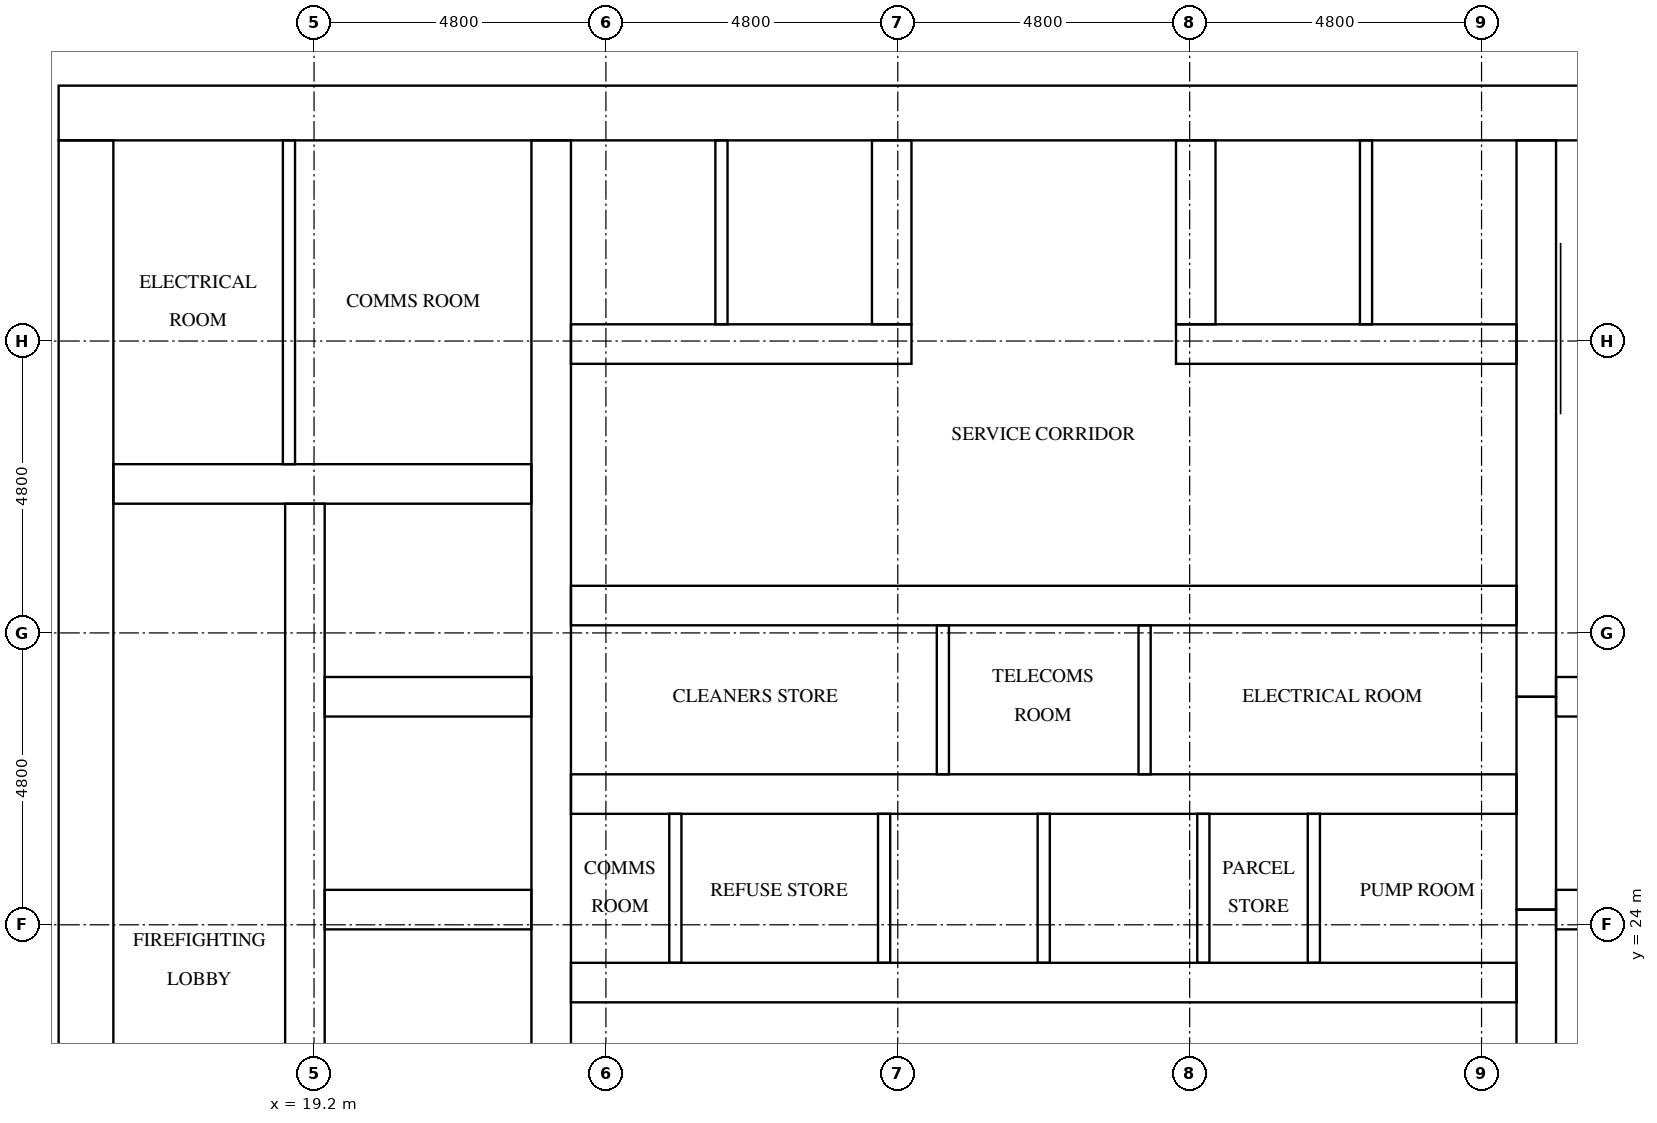
"""IFC4 building model, lengths in metres.
Left out: names, types, materials, properties, quantities, classifications, styles, units other than length and angle.
Written with IfcOpenShell. Run it as: python <this file> out.ifc"""

import sys

from ifc_helpers import new_model, si_unit, direction, frame, frame_2d, origin, place, context, subcontext, project, spatial, rectangle, extrude, element, fill, save


model = new_model("IFC4")
c1 = context("Model", 3, precision=1e-05, world=origin(), true_north=direction((0.0, 1.0)))
c2 = subcontext(c1, "Body", "Model", "MODEL_VIEW")
j1 = project(units=[si_unit("LENGTHUNIT", "METRE"), si_unit("PLANEANGLEUNIT", "RADIAN")], contexts=[c1])
p1 = place(None, origin())
s1 = spatial("IfcSite", under=j1, at=p1, CompositionType="ELEMENT")
p2 = place(p1, origin())
s2 = spatial("IfcBuilding", under=s1, at=p2, CompositionType="ELEMENT")
p3 = place(p2, frame((0.0, 0.0, 89.2)))
s3 = spatial("IfcBuildingStorey", under=s2, at=p3, CompositionType="ELEMENT", Elevation=89.2)
p4 = place(p3, frame((15.0, 37.35, 0.0), z_axis=(0.0, 0.0, 1.0), x_axis=(1.0, 0.0, 0.0)))
e1 = element("IfcWall", 1, at=p4, inside=s3, PredefinedType="SHEAR", context=c2, shape_type="SweptSolid", body=[
    extrude(rectangle(XDim=32.4, YDim=0.9, at=frame_2d((16.2, 0.0))), origin(), (0.0, 0.0, 1.0), 3.2),
])
p5 = place(p4, frame((15.3, 0.0, 0.0)))
e2 = element("IfcOpeningElement", 2, at=p5, cuts=e1, PredefinedType="OPENING", context=c2, shape_type="SweptSolid", body=[
    extrude(rectangle(XDim=1.8, YDim=2.1, at=frame_2d((0.9, 1.05))), frame((0.0, 0.46, 0.0), z_axis=(0.0, -1.0, 0.0), x_axis=(1.0, 0.0, 0.0)), (0.0, 0.0, 1.0), 0.92),
])
p6 = place(p4, frame((1.794, 0.0, 0.0)))
e3 = element("IfcOpeningElement", 3, at=p6, cuts=e1, PredefinedType="OPENING", context=c2, shape_type="SweptSolid", body=[
    extrude(rectangle(XDim=1.0, YDim=2.1, at=frame_2d((0.5, 1.05))), frame((0.0, 0.46, 0.0), z_axis=(0.0, -1.0, 0.0), x_axis=(1.0, 0.0, 0.0)), (0.0, 0.0, 1.0), 0.92),
])
p7 = place(p4, frame((5.331, 0.0, 0.0)))
e4 = element("IfcOpeningElement", 4, at=p7, cuts=e1, PredefinedType="OPENING", context=c2, shape_type="SweptSolid", body=[
    extrude(rectangle(XDim=1.0, YDim=2.1, at=frame_2d((0.5, 1.05))), frame((0.0, 0.46, 0.0), z_axis=(0.0, -1.0, 0.0), x_axis=(1.0, 0.0, 0.0)), (0.0, 0.0, 1.0), 0.92),
])
p8 = place(p3, frame((15.45, 15.9, 0.0), z_axis=(0.0, 0.0, 1.0), x_axis=(0.0, 1.0, 0.0)))
e5 = element("IfcWall", 5, at=p8, inside=s3, PredefinedType="SHEAR", context=c2, shape_type="SweptSolid", body=[
    extrude(rectangle(XDim=21.0, YDim=0.9, at=frame_2d((10.5, 0.0))), origin(), (0.0, 0.0, 1.0), 3.2),
])
p9 = place(p8, frame((4.86, 0.0, 0.0)))
e6 = element("IfcOpeningElement", 6, at=p9, cuts=e5, PredefinedType="OPENING", context=c2, shape_type="SweptSolid", body=[
    extrude(rectangle(XDim=1.2, YDim=2.1, at=frame_2d((0.6, 1.05))), frame((0.0, 0.46, 0.0), z_axis=(0.0, -1.0, 0.0), x_axis=(1.0, 0.0, 0.0)), (0.0, 0.0, 1.0), 0.92),
])
p10 = place(p3, frame((19.05, 15.9, 0.0), z_axis=(0.0, 0.0, 1.0), x_axis=(0.0, 1.0, 0.0)))
e7 = element("IfcWall", 7, at=p10, inside=s3, PredefinedType="SHEAR", context=c2, shape_type="SweptSolid", body=[
    extrude(rectangle(XDim=15.025, YDim=0.65, at=frame_2d((7.513, 0.0))), origin(), (0.0, 0.0, 1.0), 3.2),
])
p11 = place(p10, frame((9.55, 0.0, 0.0)))
e8 = element("IfcOpeningElement", 8, at=p11, cuts=e7, PredefinedType="OPENING", context=c2, shape_type="SweptSolid", body=[
    extrude(rectangle(XDim=1.1, YDim=2.1, at=frame_2d((0.55, 1.05))), frame((0.0, 0.335, 0.0), z_axis=(0.0, -1.0, 0.0), x_axis=(1.0, 0.0, 0.0)), (0.0, 0.0, 1.0), 0.67),
])
p12 = place(p10, frame((13.05, 0.0, 0.0)))
e9 = element("IfcOpeningElement", 9, at=p12, cuts=e7, PredefinedType="OPENING", context=c2, shape_type="SweptSolid", body=[
    extrude(rectangle(XDim=1.1, YDim=2.1, at=frame_2d((0.55, 1.05))), frame((0.0, 0.335, 0.0), z_axis=(0.0, -1.0, 0.0), x_axis=(1.0, 0.0, 0.0)), (0.0, 0.0, 1.0), 0.67),
])
p13 = place(p10, frame((0.3, 0.0, 0.0)))
e10 = element("IfcOpeningElement", 10, at=p13, cuts=e7, PredefinedType="OPENING", context=c2, shape_type="SweptSolid", body=[
    extrude(rectangle(XDim=1.2, YDim=2.1, at=frame_2d((0.6, 1.05))), frame((0.0, 0.335, 0.0), z_axis=(0.0, -1.0, 0.0), x_axis=(1.0, 0.0, 0.0)), (0.0, 0.0, 1.0), 0.67),
])
p14 = place(p3, frame((23.1, 15.9, 0.0), z_axis=(0.0, 0.0, 1.0), x_axis=(0.0, 1.0, 0.0)))
e11 = element("IfcWall", 11, at=p14, inside=s3, PredefinedType="SHEAR", context=c2, shape_type="SweptSolid", body=[
    extrude(rectangle(XDim=21.0, YDim=0.65, at=frame_2d((10.5, 0.0))), origin(), (0.0, 0.0, 1.0), 3.2),
])
p15 = place(p3, frame((39.3, 15.9, 0.0), z_axis=(0.0, 0.0, 1.0), x_axis=(0.0, 1.0, 0.0)))
e12 = element("IfcWall", 12, at=p15, inside=s3, PredefinedType="SHEAR", context=c2, shape_type="SweptSolid", body=[
    extrude(rectangle(XDim=8.35, YDim=0.65, at=frame_2d((4.175, 0.0))), origin(), (0.0, 0.0, 1.0), 3.2),
])
p16 = place(p3, frame((39.3, 24.25, 0.0), z_axis=(0.0, 0.0, 1.0), x_axis=(0.0, 1.0, 0.0)))
e13 = element("IfcWall", 13, at=p16, inside=s3, PredefinedType="SHEAR", context=c2, shape_type="SweptSolid", body=[
    extrude(rectangle(XDim=3.5, YDim=0.65, at=frame_2d((1.75, 0.0))), origin(), (0.0, 0.0, 1.0), 3.2),
])
p17 = place(p3, frame((39.3, 27.75, 0.0), z_axis=(0.0, 0.0, 1.0), x_axis=(0.0, 1.0, 0.0)))
e14 = element("IfcWall", 14, at=p17, inside=s3, PredefinedType="SHEAR", context=c2, shape_type="SweptSolid", body=[
    extrude(rectangle(XDim=9.15, YDim=0.65, at=frame_2d((4.575, 0.0))), origin(), (0.0, 0.0, 1.0), 3.2),
])
for number, where, z_axis, x_axis in (
    (15, (19.375, 24.25, 0.0), (0.0, 0.0, 1.0), (1.0, 0.0, 0.0)),
    (16, (19.375, 27.75, 0.0), (0.0, 0.0, 1.0), (1.0, 0.0, 0.0)),
):
    element("IfcWall", number, at=place(p3, frame(where, z_axis=z_axis, x_axis=x_axis)), inside=s3, PredefinedType="SHEAR", context=c2, shape_type="SweptSolid", body=[
        extrude(rectangle(XDim=3.4, YDim=0.65, at=frame_2d((1.7, 0.0))), origin(), (0.0, 0.0, 1.0), 3.2),
    ])
p18 = place(p3, frame((15.9, 31.25, 0.0), z_axis=(0.0, 0.0, 1.0), x_axis=(1.0, 0.0, 0.0)))
e17 = element("IfcWall", 17, at=p18, inside=s3, PredefinedType="SHEAR", context=c2, shape_type="SweptSolid", body=[
    extrude(rectangle(XDim=6.875, YDim=0.65, at=frame_2d((3.438, 0.0))), origin(), (0.0, 0.0, 1.0), 3.2),
])
for number, where, z_axis, x_axis in (
    (18, (39.625, 24.25, 0.0), (0.0, 0.0, 1.0), (1.0, 0.0, 0.0)),
    (19, (39.625, 27.75, 0.0), (0.0, 0.0, 1.0), (1.0, 0.0, 0.0)),
):
    element("IfcWall", number, at=place(p3, frame(where, z_axis=z_axis, x_axis=x_axis)), inside=s3, PredefinedType="SHEAR", context=c2, shape_type="SweptSolid", body=[
        extrude(rectangle(XDim=3.4, YDim=0.65, at=frame_2d((1.7, 0.0))), origin(), (0.0, 0.0, 1.0), 3.2),
    ])
p19 = place(p3, frame((23.425, 23.05, 0.0), z_axis=(0.0, 0.0, 1.0), x_axis=(1.0, 0.0, 0.0)))
e20 = element("IfcWall", 20, at=p19, inside=s3, PredefinedType="SHEAR", context=c2, shape_type="SweptSolid", body=[
    extrude(rectangle(XDim=15.55, YDim=0.65, at=frame_2d((7.775, 0.0))), origin(), (0.0, 0.0, 1.0), 3.2),
])
p20 = place(p19, frame((0.309, 0.0, 0.0)))
e21 = element("IfcOpeningElement", 21, at=p20, cuts=e20, PredefinedType="OPENING", context=c2, shape_type="SweptSolid", body=[
    extrude(rectangle(XDim=1.0, YDim=2.1, at=frame_2d((0.5, 1.05))), frame((0.0, 0.335, 0.0), z_axis=(0.0, -1.0, 0.0), x_axis=(1.0, 0.0, 0.0)), (0.0, 0.0, 1.0), 0.67),
])
p21 = place(p19, frame((2.934, 0.0, 0.0)))
e22 = element("IfcOpeningElement", 22, at=p21, cuts=e20, PredefinedType="OPENING", context=c2, shape_type="SweptSolid", body=[
    extrude(rectangle(XDim=1.0, YDim=2.1, at=frame_2d((0.5, 1.05))), frame((0.0, 0.335, 0.0), z_axis=(0.0, -1.0, 0.0), x_axis=(1.0, 0.0, 0.0)), (0.0, 0.0, 1.0), 0.67),
])
p22 = place(p19, frame((10.809, 0.0, 0.0)))
e23 = element("IfcOpeningElement", 23, at=p22, cuts=e20, PredefinedType="OPENING", context=c2, shape_type="SweptSolid", body=[
    extrude(rectangle(XDim=1.0, YDim=2.1, at=frame_2d((0.5, 1.05))), frame((0.0, 0.335, 0.0), z_axis=(0.0, -1.0, 0.0), x_axis=(1.0, 0.0, 0.0)), (0.0, 0.0, 1.0), 0.67),
])
p23 = place(p19, frame((13.434, 0.0, 0.0)))
e24 = element("IfcOpeningElement", 24, at=p23, cuts=e20, PredefinedType="OPENING", context=c2, shape_type="SweptSolid", body=[
    extrude(rectangle(XDim=1.0, YDim=2.1, at=frame_2d((0.5, 1.05))), frame((0.0, 0.335, 0.0), z_axis=(0.0, -1.0, 0.0), x_axis=(1.0, 0.0, 0.0)), (0.0, 0.0, 1.0), 0.67),
])
p24 = place(p3, frame((23.425, 26.15, 0.0), z_axis=(0.0, 0.0, 1.0), x_axis=(1.0, 0.0, 0.0)))
e25 = element("IfcWall", 25, at=p24, inside=s3, PredefinedType="SHEAR", context=c2, shape_type="SweptSolid", body=[
    extrude(rectangle(XDim=15.55, YDim=0.65, at=frame_2d((7.775, 0.0))), origin(), (0.0, 0.0, 1.0), 3.2),
])
p25 = place(p3, frame((23.425, 29.25, 0.0), z_axis=(0.0, 0.0, 1.0), x_axis=(1.0, 0.0, 0.0)))
e26 = element("IfcWall", 26, at=p25, inside=s3, PredefinedType="SHEAR", context=c2, shape_type="SweptSolid", body=[
    extrude(rectangle(XDim=15.55, YDim=0.65, at=frame_2d((7.775, 0.0))), origin(), (0.0, 0.0, 1.0), 3.2),
])
p26 = place(p25, frame((2.508, 0.0, 0.0)))
e27 = element("IfcOpeningElement", 27, at=p26, cuts=e26, PredefinedType="OPENING", context=c2, shape_type="SweptSolid", body=[
    extrude(rectangle(XDim=1.0, YDim=2.1, at=frame_2d((0.5, 1.05))), frame((0.0, 0.335, 0.0), z_axis=(0.0, -1.0, 0.0), x_axis=(1.0, 0.0, 0.0)), (0.0, 0.0, 1.0), 0.67),
])
p27 = place(p25, frame((7.275, 0.0, 0.0)))
e28 = element("IfcOpeningElement", 28, at=p27, cuts=e26, PredefinedType="OPENING", context=c2, shape_type="SweptSolid", body=[
    extrude(rectangle(XDim=1.0, YDim=2.1, at=frame_2d((0.5, 1.05))), frame((0.0, 0.335, 0.0), z_axis=(0.0, -1.0, 0.0), x_axis=(1.0, 0.0, 0.0)), (0.0, 0.0, 1.0), 0.67),
])
p28 = place(p25, frame((12.042, 0.0, 0.0)))
e29 = element("IfcOpeningElement", 29, at=p28, cuts=e26, PredefinedType="OPENING", context=c2, shape_type="SweptSolid", body=[
    extrude(rectangle(XDim=1.0, YDim=2.1, at=frame_2d((0.5, 1.05))), frame((0.0, 0.335, 0.0), z_axis=(0.0, -1.0, 0.0), x_axis=(1.0, 0.0, 0.0)), (0.0, 0.0, 1.0), 0.67),
])
p29 = place(p3, frame((23.425, 33.55, 0.0), z_axis=(0.0, 0.0, 1.0), x_axis=(1.0, 0.0, 0.0)))
e30 = element("IfcWall", 30, at=p29, inside=s3, PredefinedType="SHEAR", context=c2, shape_type="SweptSolid", body=[
    extrude(rectangle(XDim=5.6, YDim=0.65, at=frame_2d((2.8, 0.0))), origin(), (0.0, 0.0, 1.0), 3.2),
])
p30 = place(p3, frame((33.375, 33.55, 0.0), z_axis=(0.0, 0.0, 1.0), x_axis=(1.0, 0.0, 0.0)))
e31 = element("IfcWall", 31, at=p30, inside=s3, PredefinedType="SHEAR", context=c2, shape_type="SweptSolid", body=[
    extrude(rectangle(XDim=5.6, YDim=0.65, at=frame_2d((2.8, 0.0))), origin(), (0.0, 0.0, 1.0), 3.2),
])
for number, where, z_axis, x_axis in (
    (32, (28.7, 33.875, 0.0), (0.0, 0.0, 1.0), (0.0, 1.0, 0.0)),
    (33, (33.7, 33.875, 0.0), (0.0, 0.0, 1.0), (0.0, 1.0, 0.0)),
):
    element("IfcWall", number, at=place(p3, frame(where, z_axis=z_axis, x_axis=x_axis)), inside=s3, PredefinedType="SHEAR", context=c2, shape_type="SweptSolid", body=[
        extrude(rectangle(XDim=3.025, YDim=0.65, at=frame_2d((1.512, 0.0))), origin(), (0.0, 0.0, 1.0), 3.2),
    ])
for number, where, z_axis, x_axis in (
    (34, (28.575, 23.375, 0.0), (0.0, 0.0, 1.0), (0.0, 1.0, 0.0)),
    (35, (31.2, 23.375, 0.0), (0.0, 0.0, 1.0), (0.0, 1.0, 0.0)),
    (36, (33.825, 23.375, 0.0), (0.0, 0.0, 1.0), (0.0, 1.0, 0.0)),
):
    element("IfcWall", number, at=place(p3, frame(where, z_axis=z_axis, x_axis=x_axis)), inside=s3, PredefinedType="SOLIDWALL", context=c2, shape_type="SweptSolid", body=[
        extrude(rectangle(XDim=2.45, YDim=0.2, at=frame_2d((1.225, 0.0))), origin(), (0.0, 0.0, 1.0), 3.2),
    ])
for number, where, z_axis, x_axis in (
    (37, (25.9, 33.875, 0.0), (0.0, 0.0, 1.0), (0.0, 1.0, 0.0)),
    (38, (36.5, 33.875, 0.0), (0.0, 0.0, 1.0), (0.0, 1.0, 0.0)),
):
    element("IfcWall", number, at=place(p3, frame(where, z_axis=z_axis, x_axis=x_axis)), inside=s3, PredefinedType="SOLIDWALL", context=c2, shape_type="SweptSolid", body=[
        extrude(rectangle(XDim=3.025, YDim=0.2, at=frame_2d((1.512, 0.0))), origin(), (0.0, 0.0, 1.0), 3.2),
    ])
p31 = place(p3, frame((18.788, 31.575, 0.0), z_axis=(0.0, 0.0, 1.0), x_axis=(0.0, 1.0, 0.0)))
e39 = element("IfcWall", 39, at=p31, inside=s3, PredefinedType="PARTITIONING", context=c2, shape_type="SweptSolid", body=[
    extrude(rectangle(XDim=5.325, YDim=0.2, at=frame_2d((2.663, 0.0))), origin(), (0.0, 0.0, 1.0), 3.2),
])
for number, where, z_axis, x_axis in (
    (40, (25.142, 23.375, 0.0), (0.0, 0.0, 1.0), (0.0, 1.0, 0.0)),
    (41, (35.642, 23.375, 0.0), (0.0, 0.0, 1.0), (0.0, 1.0, 0.0)),
    (42, (29.541, 26.475, 0.0), (0.0, 0.0, 1.0), (0.0, 1.0, 0.0)),
    (43, (32.859, 26.475, 0.0), (0.0, 0.0, 1.0), (0.0, 1.0, 0.0)),
):
    element("IfcWall", number, at=place(p3, frame(where, z_axis=z_axis, x_axis=x_axis)), inside=s3, PredefinedType="PARTITIONING", context=c2, shape_type="SweptSolid", body=[
        extrude(rectangle(XDim=2.45, YDim=0.2, at=frame_2d((1.225, 0.0))), origin(), (0.0, 0.0, 1.0), 3.2),
    ])
p32 = place(p11, origin())
e44 = element("IfcDoor", 44, at=p32, inside=s3, OperationType="DOUBLE_DOOR_SLIDING", PredefinedType="DOOR", context=c2, shape_type="SweptSolid", body=[
    extrude(rectangle(XDim=1.1, YDim=2.1, at=frame_2d((0.55, 1.05))), frame((0.0, 0.025, 0.0), z_axis=(0.0, -1.0, 0.0), x_axis=(1.0, 0.0, 0.0)), (0.0, 0.0, 1.0), 0.05),
])
fill(e8, e44)
p33 = place(p12, origin())
e45 = element("IfcDoor", 45, at=p33, inside=s3, OperationType="DOUBLE_DOOR_SLIDING", PredefinedType="DOOR", context=c2, shape_type="SweptSolid", body=[
    extrude(rectangle(XDim=1.1, YDim=2.1, at=frame_2d((0.55, 1.05))), frame((0.0, 0.025, 0.0), z_axis=(0.0, -1.0, 0.0), x_axis=(1.0, 0.0, 0.0)), (0.0, 0.0, 1.0), 0.05),
])
fill(e9, e45)
p34 = place(p5, origin())
e46 = element("IfcDoor", 46, at=p34, inside=s3, OperationType="DOUBLE_DOOR_SINGLE_SWING", PredefinedType="DOOR", context=c2, shape_type="SweptSolid", body=[
    extrude(rectangle(XDim=1.8, YDim=2.1, at=frame_2d((0.9, 1.05))), frame((0.0, 0.025, 0.0), z_axis=(0.0, -1.0, 0.0), x_axis=(1.0, 0.0, 0.0)), (0.0, 0.0, 1.0), 0.05),
])
fill(e2, e46)
p35 = place(p6, origin())
e47 = element("IfcDoor", 47, at=p35, inside=s3, OperationType="SINGLE_SWING_LEFT", PredefinedType="DOOR", context=c2, shape_type="SweptSolid", body=[
    extrude(rectangle(XDim=1.0, YDim=2.1, at=frame_2d((0.5, 1.05))), frame((0.0, 0.025, 0.0), z_axis=(0.0, -1.0, 0.0), x_axis=(1.0, 0.0, 0.0)), (0.0, 0.0, 1.0), 0.05),
])
fill(e3, e47)
p36 = place(p7, origin())
e48 = element("IfcDoor", 48, at=p36, inside=s3, OperationType="SINGLE_SWING_RIGHT", PredefinedType="DOOR", context=c2, shape_type="SweptSolid", body=[
    extrude(rectangle(XDim=1.0, YDim=2.1, at=frame_2d((0.5, 1.05))), frame((0.0, 0.025, 0.0), z_axis=(0.0, -1.0, 0.0), x_axis=(1.0, 0.0, 0.0)), (0.0, 0.0, 1.0), 0.05),
])
fill(e4, e48)
p37 = place(p20, frame((1.0, 0.0, 0.0), z_axis=(0.0, 0.0, 1.0), x_axis=(-1.0, 0.0, 0.0)))
e49 = element("IfcDoor", 49, at=p37, inside=s3, OperationType="SINGLE_SWING_LEFT", PredefinedType="DOOR", context=c2, shape_type="SweptSolid", body=[
    extrude(rectangle(XDim=1.0, YDim=2.1, at=frame_2d((0.5, 1.05))), frame((0.0, 0.025, 0.0), z_axis=(0.0, -1.0, 0.0), x_axis=(1.0, 0.0, 0.0)), (0.0, 0.0, 1.0), 0.05),
])
fill(e21, e49)
p38 = place(p21, frame((1.0, 0.0, 0.0), z_axis=(0.0, 0.0, 1.0), x_axis=(-1.0, 0.0, 0.0)))
e50 = element("IfcDoor", 50, at=p38, inside=s3, OperationType="SINGLE_SWING_RIGHT", PredefinedType="DOOR", context=c2, shape_type="SweptSolid", body=[
    extrude(rectangle(XDim=1.0, YDim=2.1, at=frame_2d((0.5, 1.05))), frame((0.0, 0.025, 0.0), z_axis=(0.0, -1.0, 0.0), x_axis=(1.0, 0.0, 0.0)), (0.0, 0.0, 1.0), 0.05),
])
fill(e22, e50)
p39 = place(p22, frame((1.0, 0.0, 0.0), z_axis=(0.0, 0.0, 1.0), x_axis=(-1.0, 0.0, 0.0)))
e51 = element("IfcDoor", 51, at=p39, inside=s3, OperationType="SINGLE_SWING_LEFT", PredefinedType="DOOR", context=c2, shape_type="SweptSolid", body=[
    extrude(rectangle(XDim=1.0, YDim=2.1, at=frame_2d((0.5, 1.05))), frame((0.0, 0.025, 0.0), z_axis=(0.0, -1.0, 0.0), x_axis=(1.0, 0.0, 0.0)), (0.0, 0.0, 1.0), 0.05),
])
fill(e23, e51)
p40 = place(p23, frame((1.0, 0.0, 0.0), z_axis=(0.0, 0.0, 1.0), x_axis=(-1.0, 0.0, 0.0)))
e52 = element("IfcDoor", 52, at=p40, inside=s3, OperationType="SINGLE_SWING_RIGHT", PredefinedType="DOOR", context=c2, shape_type="SweptSolid", body=[
    extrude(rectangle(XDim=1.0, YDim=2.1, at=frame_2d((0.5, 1.05))), frame((0.0, 0.025, 0.0), z_axis=(0.0, -1.0, 0.0), x_axis=(1.0, 0.0, 0.0)), (0.0, 0.0, 1.0), 0.05),
])
fill(e24, e52)
p41 = place(p26, origin())
e53 = element("IfcDoor", 53, at=p41, inside=s3, OperationType="SINGLE_SWING_LEFT", PredefinedType="DOOR", context=c2, shape_type="SweptSolid", body=[
    extrude(rectangle(XDim=1.0, YDim=2.1, at=frame_2d((0.5, 1.05))), frame((0.0, 0.025, 0.0), z_axis=(0.0, -1.0, 0.0), x_axis=(1.0, 0.0, 0.0)), (0.0, 0.0, 1.0), 0.05),
])
fill(e27, e53)
p42 = place(p27, origin())
e54 = element("IfcDoor", 54, at=p42, inside=s3, OperationType="SINGLE_SWING_RIGHT", PredefinedType="DOOR", context=c2, shape_type="SweptSolid", body=[
    extrude(rectangle(XDim=1.0, YDim=2.1, at=frame_2d((0.5, 1.05))), frame((0.0, 0.025, 0.0), z_axis=(0.0, -1.0, 0.0), x_axis=(1.0, 0.0, 0.0)), (0.0, 0.0, 1.0), 0.05),
])
fill(e28, e54)
p43 = place(p28, origin())
e55 = element("IfcDoor", 55, at=p43, inside=s3, OperationType="SINGLE_SWING_LEFT", PredefinedType="DOOR", context=c2, shape_type="SweptSolid", body=[
    extrude(rectangle(XDim=1.0, YDim=2.1, at=frame_2d((0.5, 1.05))), frame((0.0, 0.025, 0.0), z_axis=(0.0, -1.0, 0.0), x_axis=(1.0, 0.0, 0.0)), (0.0, 0.0, 1.0), 0.05),
])
fill(e29, e55)
save(model, sys.argv[1])
